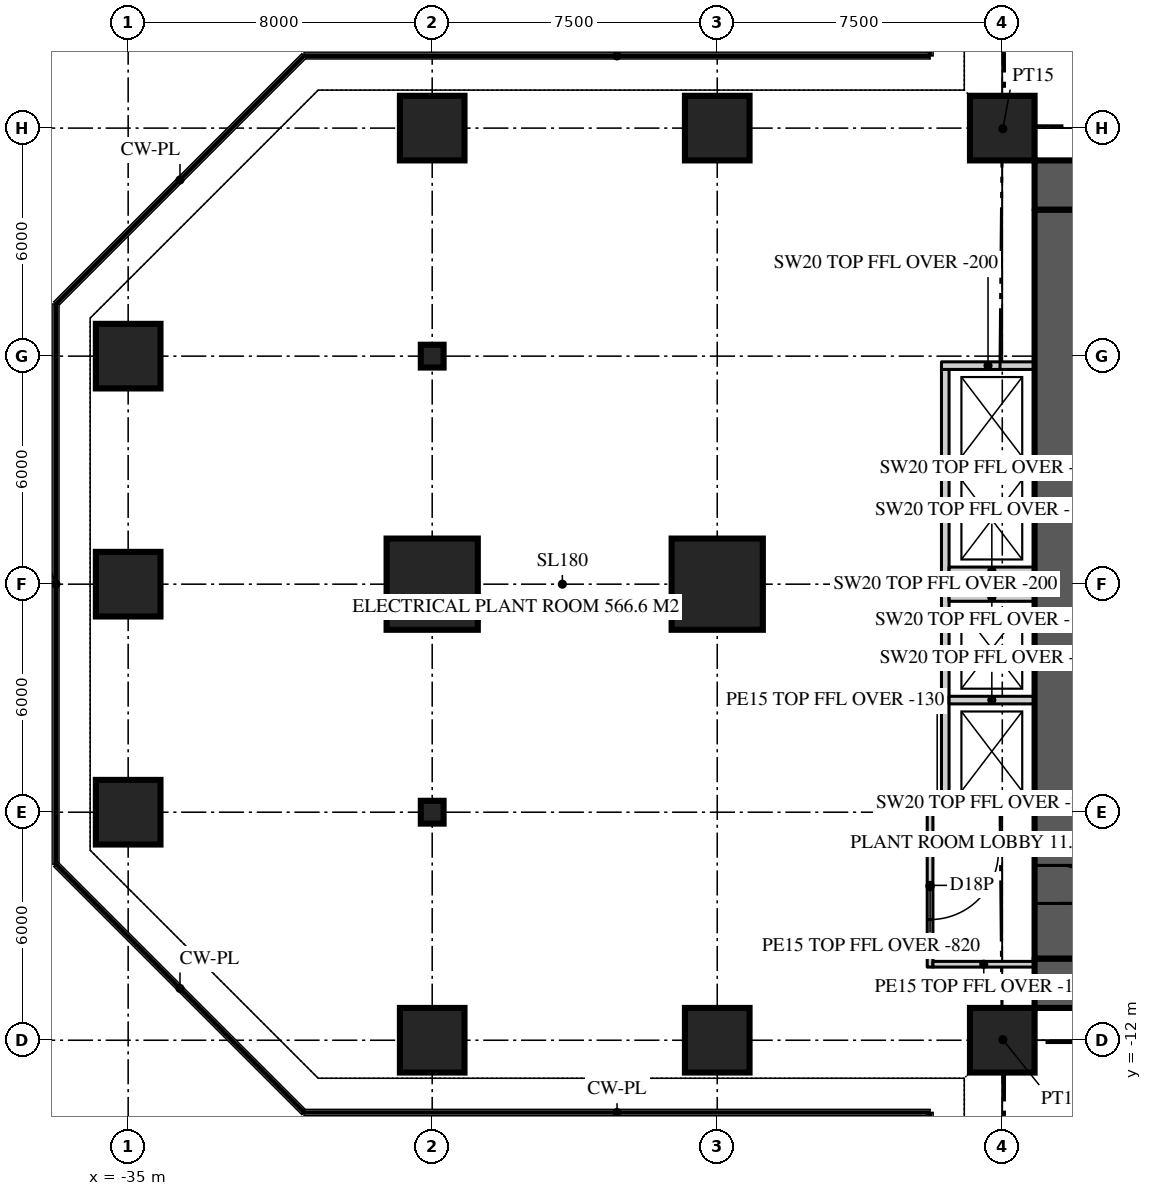
"""IFC4 building model, lengths in metres.
Left out: names, types, materials, properties, quantities, classifications, styles, units other than length and angle.
Written with IfcOpenShell. Run it as: python <this file> out.ifc"""

import sys

from ifc_helpers import new_model, si_unit, direction, frame, frame_2d, origin, origin_2d, place, context, subcontext, project, spatial, rectangle, hollow_rectangle, extrude, element, fill, save


model = new_model("IFC4")
c1 = context("Model", 3, precision=1e-05, world=origin(), true_north=direction((0.0, 1.0)))
c2 = subcontext(c1, "Body", "Model", "MODEL_VIEW")
j1 = project(units=[si_unit("LENGTHUNIT", "METRE"), si_unit("PLANEANGLEUNIT", "RADIAN")], contexts=[c1])
p1 = place(None, origin())
s1 = spatial("IfcSite", under=j1, at=p1, CompositionType="ELEMENT")
p2 = place(p1, origin())
s2 = spatial("IfcBuilding", under=s1, at=p2, CompositionType="ELEMENT")
p3 = place(p2, frame((0.0, 0.0, 198.9)))
s3 = spatial("IfcBuildingStorey", under=s2, at=p3, CompositionType="ELEMENT", Elevation=198.9)
p4 = place(p3, frame((-11.15, 10.5, 0.0), z_axis=(0.0, 0.0, 1.0), x_axis=(1.0, 0.0, 0.0)))
e1 = element("IfcWall", 1, at=p4, inside=s3, PredefinedType="SHEAR", context=c2, shape_type="SweptSolid", body=[
    extrude(rectangle(XDim=22.3, YDim=1.3, at=frame_2d((11.15, 0.0))), origin(), (0.0, 0.0, 1.0), 6.0),
])
p5 = place(p4, frame((4.25, 0.0, 0.0)))
e2 = element("IfcOpeningElement", 2, at=p5, cuts=e1, PredefinedType="OPENING", context=c2, shape_type="SweptSolid", body=[
    extrude(rectangle(XDim=1.8, YDim=2.2, at=frame_2d((0.9, 1.1))), frame((0.0, 0.66, 0.0), z_axis=(0.0, -1.0, 0.0), x_axis=(1.0, 0.0, 0.0)), (0.0, 0.0, 1.0), 1.32),
])
p6 = place(p4, frame((16.25, 0.0, 0.0)))
e3 = element("IfcOpeningElement", 3, at=p6, cuts=e1, PredefinedType="OPENING", context=c2, shape_type="SweptSolid", body=[
    extrude(rectangle(XDim=1.8, YDim=2.2, at=frame_2d((0.9, 1.1))), frame((0.0, 0.66, 0.0), z_axis=(0.0, -1.0, 0.0), x_axis=(1.0, 0.0, 0.0)), (0.0, 0.0, 1.0), 1.32),
])
p7 = place(p3, frame((11.15, -10.5, 0.0), z_axis=(0.0, 0.0, 1.0), x_axis=(-1.0, 0.0, 0.0)))
e4 = element("IfcWall", 4, at=p7, inside=s3, PredefinedType="SHEAR", context=c2, shape_type="SweptSolid", body=[
    extrude(rectangle(XDim=22.3, YDim=1.3, at=frame_2d((11.15, 0.0))), origin(), (0.0, 0.0, 1.0), 6.0),
])
p8 = place(p7, frame((16.25, 0.0, 0.0)))
e5 = element("IfcOpeningElement", 5, at=p8, cuts=e4, PredefinedType="OPENING", context=c2, shape_type="SweptSolid", body=[
    extrude(rectangle(XDim=1.8, YDim=2.2, at=frame_2d((0.9, 1.1))), frame((0.0, 0.66, 0.0), z_axis=(0.0, -1.0, 0.0), x_axis=(1.0, 0.0, 0.0)), (0.0, 0.0, 1.0), 1.32),
])
p9 = place(p7, frame((4.25, 0.0, 0.0)))
e6 = element("IfcOpeningElement", 6, at=p9, cuts=e4, PredefinedType="OPENING", context=c2, shape_type="SweptSolid", body=[
    extrude(rectangle(XDim=1.8, YDim=2.2, at=frame_2d((0.9, 1.1))), frame((0.0, 0.66, 0.0), z_axis=(0.0, -1.0, 0.0), x_axis=(1.0, 0.0, 0.0)), (0.0, 0.0, 1.0), 1.32),
])
p10 = place(p3, frame((-10.5, 9.85, 0.0), z_axis=(0.0, 0.0, 1.0), x_axis=(0.0, -1.0, 0.0)))
e7 = element("IfcWall", 7, at=p10, inside=s3, PredefinedType="SHEAR", context=c2, shape_type="SweptSolid", body=[
    extrude(rectangle(XDim=19.7, YDim=1.3, at=frame_2d((9.85, 0.0))), origin(), (0.0, 0.0, 1.0), 6.0),
])
p11 = place(p10, frame((17.25, 0.0, 0.0)))
e8 = element("IfcOpeningElement", 8, at=p11, cuts=e7, PredefinedType="OPENING", context=c2, shape_type="SweptSolid", body=[
    extrude(rectangle(XDim=1.0, YDim=2.2, at=frame_2d((0.5, 1.1))), frame((0.0, 0.66, 0.0), z_axis=(0.0, -1.0, 0.0), x_axis=(1.0, 0.0, 0.0)), (0.0, 0.0, 1.0), 1.32),
])
for number, where, z_axis, x_axis in (
    (9, (-27.0, -12.0, 0.0), (0.0, 0.0, 1.0), (1.0, 0.0, 0.0)),
    (10, (-19.5, -12.0, 0.0), (0.0, 0.0, 1.0), (1.0, 0.0, 0.0)),
    (11, (-12.0, -12.0, 0.0), (0.0, 0.0, 1.0), (1.0, 0.0, 0.0)),
    (12, (-35.0, -6.0, 0.0), (0.0, 0.0, 1.0), (1.0, 0.0, 0.0)),
    (13, (-35.0, 0.0, 0.0), (0.0, 0.0, 1.0), (1.0, 0.0, 0.0)),
):
    element("IfcColumn", number, at=place(p3, frame(where, z_axis=z_axis, x_axis=x_axis)), inside=s3, PredefinedType="COLUMN", context=c2, shape_type="SweptSolid", body=[
        extrude(rectangle(XDim=1.7, YDim=1.7, at=origin_2d()), origin(), (0.0, 0.0, 1.0), 6.0),
    ])
for number, where, z_axis, x_axis in (
    (14, (-27.0, 0.0, 0.0), (0.0, 0.0, 1.0), (1.0, 0.0, 0.0)),
    (15, (-19.5, 0.0, 0.0), (0.0, 0.0, 1.0), (1.0, 0.0, 0.0)),
):
    element("IfcColumn", number, at=place(p3, frame(where, z_axis=z_axis, x_axis=x_axis)), inside=s3, PredefinedType="COLUMN", context=c2, shape_type="SweptSolid", body=[
        extrude(rectangle(XDim=2.4, YDim=2.4, at=origin_2d()), origin(), (0.0, 0.0, 1.0), 6.0),
    ])
for number, where, z_axis, x_axis in (
    (16, (-35.0, 6.0, 0.0), (0.0, 0.0, 1.0), (1.0, 0.0, 0.0)),
    (17, (-27.0, 12.0, 0.0), (0.0, 0.0, 1.0), (1.0, 0.0, 0.0)),
    (18, (-19.5, 12.0, 0.0), (0.0, 0.0, 1.0), (1.0, 0.0, 0.0)),
    (19, (-12.0, 12.0, 0.0), (0.0, 0.0, 1.0), (1.0, 0.0, 0.0)),
):
    element("IfcColumn", number, at=place(p3, frame(where, z_axis=z_axis, x_axis=x_axis)), inside=s3, PredefinedType="COLUMN", context=c2, shape_type="SweptSolid", body=[
        extrude(rectangle(XDim=1.7, YDim=1.7, at=origin_2d()), origin(), (0.0, 0.0, 1.0), 6.0),
    ])
for number, where, z_axis, x_axis in (
    (20, (-27.0, 6.0, -0.18), (0.0, 0.0, 1.0), (1.0, 0.0, 0.0)),
    (21, (-27.0, -6.0, -0.18), (0.0, 0.0, 1.0), (1.0, 0.0, 0.0)),
):
    element("IfcColumn", number, at=place(p3, frame(where, z_axis=z_axis, x_axis=x_axis)), inside=s3, PredefinedType="COLUMN", context=c2, shape_type="SweptSolid", body=[
        extrude(hollow_rectangle(XDim=1.0, YDim=1.0, WallThickness=0.06, at=origin_2d()), origin(), (0.0, 0.0, 1.0), 5.05),
    ])
p12 = place(p3, frame((-13.9, -5.85, 0.0), z_axis=(0.0, 0.0, 1.0), x_axis=(0.0, -1.0, 0.0)))
e22 = element("IfcWall", 22, at=p12, inside=s3, PredefinedType="SOLIDWALL", context=c2, shape_type="SweptSolid", body=[
    extrude(rectangle(XDim=4.225, YDim=0.15, at=frame_2d((2.112, 0.0))), origin(), (0.0, 0.0, 1.0), 5.18),
])
p13 = place(p12, frame((1.175, 0.0, 0.0)))
e23 = element("IfcOpeningElement", 23, at=p13, cuts=e22, PredefinedType="OPENING", context=c2, shape_type="SweptSolid", body=[
    extrude(rectangle(XDim=1.8, YDim=2.4, at=frame_2d((0.9, 1.2))), frame((0.0, 0.085, 0.0), z_axis=(0.0, -1.0, 0.0), x_axis=(1.0, 0.0, 0.0)), (0.0, 0.0, 1.0), 0.17),
])
p14 = place(p3, frame((-11.15, -10.0, 0.0), z_axis=(0.0, 0.0, 1.0), x_axis=(-1.0, 0.0, 0.0)))
e24 = element("IfcWall", 24, at=p14, inside=s3, PredefinedType="SOLIDWALL", context=c2, shape_type="SweptSolid", body=[
    extrude(rectangle(XDim=2.675, YDim=0.15, at=frame_2d((1.337, 0.0))), origin(), (0.0, 0.0, 1.0), 5.87),
])
p15 = place(p3, frame((-13.6, -5.75, 0.0), z_axis=(0.0, 0.0, 1.0), x_axis=(-1.0, 0.0, 0.0)))
e25 = element("IfcWall", 25, at=p15, inside=s3, PredefinedType="SOLIDWALL", context=c2, shape_type="SweptSolid", body=[
    extrude(rectangle(XDim=0.225, YDim=0.2, at=frame_2d((0.112, 0.0))), origin(), (0.0, 0.0, 1.0), 5.87),
])
p16 = place(p3, frame((-13.5, 5.65, 0.0), z_axis=(0.0, 0.0, 1.0), x_axis=(0.0, -1.0, 0.0)))
e26 = element("IfcWall", 26, at=p16, inside=s3, PredefinedType="SOLIDWALL", context=c2, shape_type="SweptSolid", body=[
    extrude(rectangle(XDim=11.3, YDim=0.2, at=frame_2d((5.65, 0.0))), origin(), (0.0, 0.0, 1.0), 5.8),
])
for number, where, z_axis, x_axis in (
    (27, (-11.15, 5.75, 0.0), (0.0, 0.0, 1.0), (-1.0, 0.0, 0.0)),
    (28, (-11.15, -5.75, 0.0), (0.0, 0.0, 1.0), (-1.0, 0.0, 0.0)),
):
    element("IfcWall", number, at=place(p3, frame(where, z_axis=z_axis, x_axis=x_axis)), inside=s3, PredefinedType="SOLIDWALL", context=c2, shape_type="SweptSolid", body=[
        extrude(rectangle(XDim=2.45, YDim=0.2, at=frame_2d((1.225, 0.0))), origin(), (0.0, 0.0, 1.0), 5.8),
    ])
p17 = place(p3, frame((-11.15, 3.05, 0.0), z_axis=(0.0, 0.0, 1.0), x_axis=(-1.0, 0.0, 0.0)))
e29 = element("IfcWall", 29, at=p17, inside=s3, PredefinedType="SOLIDWALL", context=c2, shape_type="SweptSolid", body=[
    extrude(rectangle(XDim=2.25, YDim=0.2, at=frame_2d((1.125, 0.0))), origin(), (0.0, 0.0, 1.0), 5.8),
])
for number, where, z_axis, x_axis in (
    (30, (-11.15, 0.35, 0.0), (0.0, 0.0, 1.0), (-1.0, 0.0, 0.0)),
    (31, (-11.15, -0.35, 0.0), (0.0, 0.0, 1.0), (-1.0, 0.0, 0.0)),
):
    element("IfcWall", number, at=place(p3, frame(where, z_axis=z_axis, x_axis=x_axis)), inside=s3, PredefinedType="SOLIDWALL", context=c2, shape_type="SweptSolid", body=[
        extrude(rectangle(XDim=2.25, YDim=0.2, at=frame_2d((1.125, 0.0))), origin(), (0.0, 0.0, 1.0), 4.87),
    ])
p18 = place(p3, frame((-11.15, -3.05, 0.0), z_axis=(0.0, 0.0, 1.0), x_axis=(-1.0, 0.0, 0.0)))
e32 = element("IfcWall", 32, at=p18, inside=s3, PredefinedType="SOLIDWALL", context=c2, shape_type="SweptSolid", body=[
    extrude(rectangle(XDim=2.25, YDim=0.2, at=frame_2d((1.125, 0.0))), origin(), (0.0, 0.0, 1.0), 5.8),
])
for number, where, z_axis, x_axis in (
    (33, (-11.15, 11.15, 0.0), (0.0, 0.0, 1.0), (-0.707, 0.707, 0.0)),
    (34, (-11.15, -11.15, 0.0), (0.0, 0.0, 1.0), (-0.707, -0.707, 0.0)),
):
    element("IfcWall", number, at=place(p3, frame(where, z_axis=z_axis, x_axis=x_axis)), inside=s3, PredefinedType="PARTITIONING", context=c2, shape_type="SweptSolid", body=[
        extrude(rectangle(XDim=2.362, YDim=0.15, at=frame_2d((1.181, 0.0))), origin(), (0.0, 0.0, 1.0), 5.32),
    ])
p19 = place(p11, origin())
e35 = element("IfcDoor", 35, at=p19, inside=s3, OperationType="SINGLE_SWING_RIGHT", PredefinedType="DOOR", context=c2, shape_type="SweptSolid", body=[
    extrude(rectangle(XDim=1.0, YDim=2.2, at=frame_2d((0.5, 1.1))), frame((0.0, 0.025, 0.0), z_axis=(0.0, -1.0, 0.0), x_axis=(1.0, 0.0, 0.0)), (0.0, 0.0, 1.0), 0.05),
])
fill(e8, e35)
p20 = place(p13, origin())
e36 = element("IfcDoor", 36, at=p20, inside=s3, OperationType="DOUBLE_DOOR_DOUBLE_SWING", PredefinedType="DOOR", context=c2, shape_type="SweptSolid", body=[
    extrude(rectangle(XDim=1.8, YDim=2.4, at=frame_2d((0.9, 1.2))), frame((0.0, 0.025, 0.0), z_axis=(0.0, -1.0, 0.0), x_axis=(1.0, 0.0, 0.0)), (0.0, 0.0, 1.0), 0.05),
])
fill(e23, e36)
save(model, sys.argv[1])
